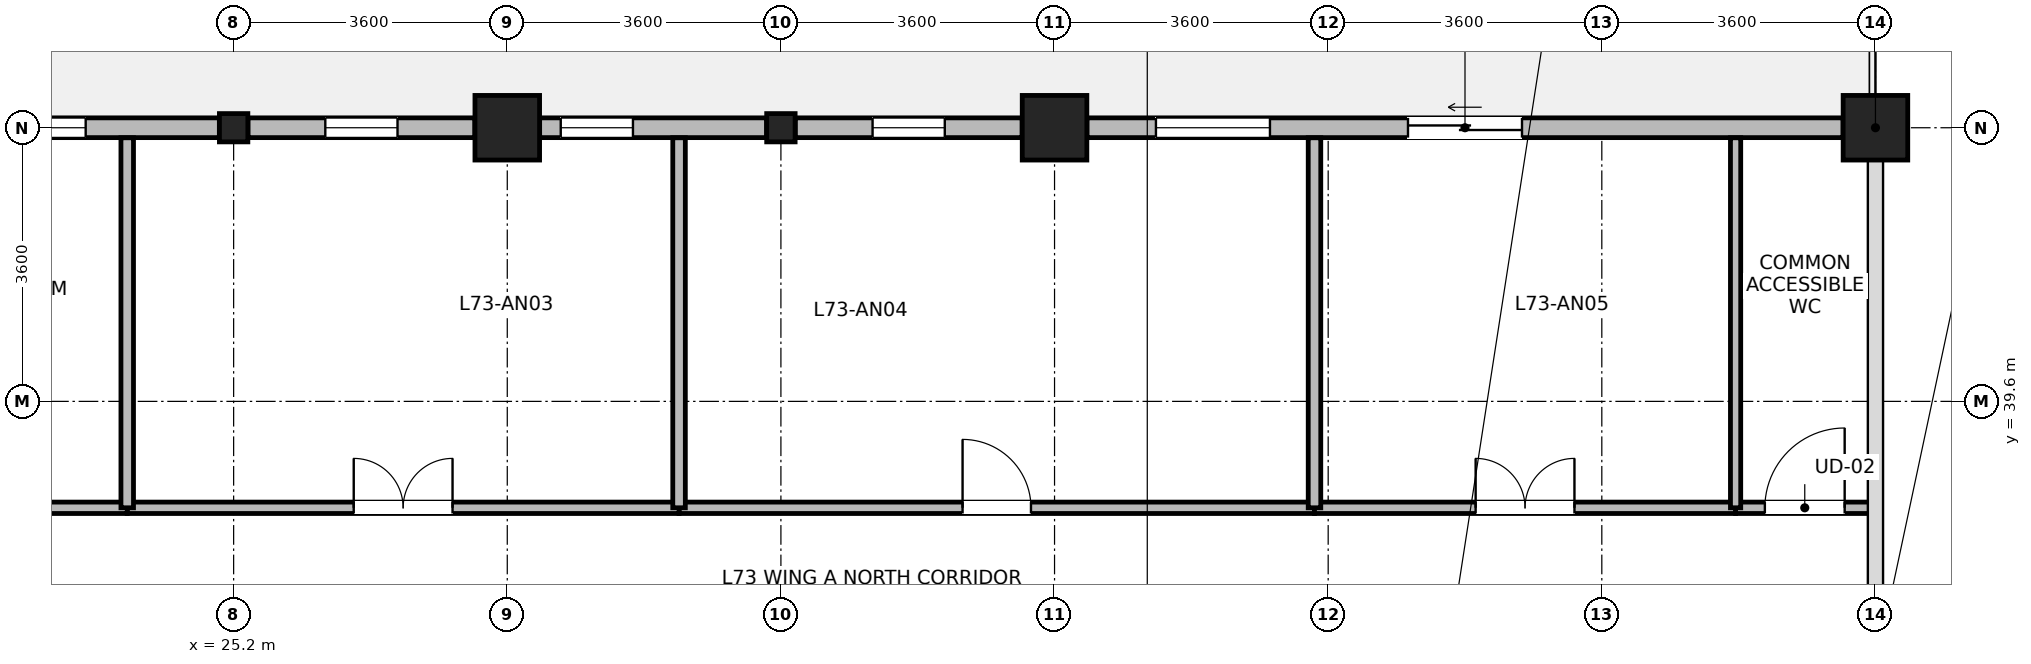
"""IFC4 building model, lengths in metres.
Left out: names, types, materials, properties, quantities, classifications, styles, units other than length and angle.
Written with IfcOpenShell. Run it as: python <this file> out.ifc"""

import sys

from ifc_helpers import new_model, si_unit, direction, frame, frame_2d, origin, origin_2d, place, context, subcontext, project, spatial, rectangle, i_section, extrude, source, transform, mapped, element, fill, save


model = new_model("IFC4")
c1 = context("Model", 3, precision=1e-05, world=origin(), true_north=direction((0.0, 1.0)))
c2 = subcontext(c1, "Body", "Model", "MODEL_VIEW")
j1 = project(units=[si_unit("LENGTHUNIT", "METRE"), si_unit("PLANEANGLEUNIT", "RADIAN")], contexts=[c1])
p1 = place(None, origin())
s1 = spatial("IfcSite", under=j1, at=p1, CompositionType="ELEMENT")
p2 = place(p1, origin())
s2 = spatial("IfcBuilding", under=s1, at=p2, CompositionType="ELEMENT")
p3 = place(p2, frame((0.0, 0.0, 283.2)))
s3 = spatial("IfcBuildingStorey", under=s2, at=p3, CompositionType="ELEMENT", Elevation=283.2)
m1 = source(origin(), c2, "Body", "SweptSolid", [
    extrude(rectangle(XDim=0.85, YDim=0.85, at=origin_2d()), origin(), (0.0, 0.0, 1.0), 3.7),
])
for number, where, z_axis, x_axis in (
    (1, (28.8, 43.2, 0.0), (0.0, 0.0, 1.0), (1.0, 0.0, 0.0)),
    (2, (36.0, 43.2, 0.0), (0.0, 0.0, 1.0), (1.0, 0.0, 0.0)),
    (3, (46.8, 43.2, 0.0), (0.0, 0.0, 1.0), (1.0, 0.0, 0.0)),
):
    element("IfcColumn", number, at=place(p3, frame(where, z_axis=z_axis, x_axis=x_axis)), inside=s3, PredefinedType="COLUMN", context=c2, shape_type="MappedRepresentation", body=[
        mapped(m1, transform((0.0, 0.0, 0.0), x_axis=(1.0, 0.0, 0.0), y_axis=(0.0, 1.0, 0.0), z_axis=(0.0, 0.0, 1.0), scale=1.0)),
    ])
m2 = source(origin(), c2, "Body", "SweptSolid", [
    extrude(i_section(OverallWidth=0.374, OverallDepth=0.372, WebThickness=0.015, FlangeThickness=0.026, FilletRadius=0.015, at=origin_2d()), origin(), (0.0, 0.0, 1.0), 3.7),
])
for number, where, z_axis, x_axis in (
    (4, (25.2, 43.2, 0.0), (0.0, 0.0, 1.0), (1.0, 0.0, 0.0)),
    (5, (32.4, 43.2, 0.0), (0.0, 0.0, 1.0), (1.0, 0.0, 0.0)),
):
    element("IfcColumn", number, at=place(p3, frame(where, z_axis=z_axis, x_axis=x_axis)), inside=s3, PredefinedType="COLUMN", context=c2, shape_type="MappedRepresentation", body=[
        mapped(m2, transform((0.0, 0.0, 0.0), x_axis=(1.0, 0.0, 0.0), y_axis=(0.0, 1.0, 0.0), z_axis=(0.0, 0.0, 1.0), scale=1.0)),
    ])
p4 = place(p3, frame((36.426, 43.2, 0.0), z_axis=(0.0, 0.0, 1.0), x_axis=(1.0, 0.0, 0.0)))
e6 = element("IfcWall", 6, at=p4, inside=s3, PredefinedType="STANDARD", context=c2, shape_type="SweptSolid", body=[
    extrude(rectangle(XDim=9.948, YDim=0.26, at=frame_2d((4.974, 0.0))), origin(), (0.0, 0.0, 1.0), 3.055),
])
p5 = place(p4, frame((4.224, 0.0, 0.0)))
e7 = element("IfcOpeningElement", 7, at=p5, cuts=e6, PredefinedType="OPENING", context=c2, shape_type="SweptSolid", body=[
    extrude(rectangle(XDim=1.5, YDim=2.15, at=frame_2d((0.75, 1.075))), frame((0.0, 0.14, 0.0), z_axis=(0.0, -1.0, 0.0), x_axis=(1.0, 0.0, 0.0)), (0.0, 0.0, 1.0), 0.28),
])
p6 = place(p4, frame((0.908, 0.0, 0.85)))
e8 = element("IfcOpeningElement", 8, at=p6, cuts=e6, PredefinedType="OPENING", context=c2, shape_type="SweptSolid", body=[
    extrude(rectangle(XDim=1.5, YDim=1.85, at=frame_2d((0.75, 0.925))), frame((0.0, 0.14, 0.0), z_axis=(0.0, -1.0, 0.0), x_axis=(1.0, 0.0, 0.0)), (0.0, 0.0, 1.0), 0.28),
])
p7 = place(p3, frame((32.588, 43.2, 0.0), z_axis=(0.0, 0.0, 1.0), x_axis=(1.0, 0.0, 0.0)))
e9 = element("IfcWall", 9, at=p7, inside=s3, PredefinedType="STANDARD", context=c2, shape_type="SweptSolid", body=[
    extrude(rectangle(XDim=2.986, YDim=0.26, at=frame_2d((1.493, 0.0))), origin(), (0.0, 0.0, 1.0), 3.055),
])
p8 = place(p7, frame((1.018, 0.0, 0.85)))
e10 = element("IfcOpeningElement", 10, at=p8, cuts=e9, PredefinedType="OPENING", context=c2, shape_type="SweptSolid", body=[
    extrude(rectangle(XDim=0.95, YDim=1.75, at=frame_2d((0.475, 0.875))), frame((0.0, 0.14, 0.0), z_axis=(0.0, -1.0, 0.0), x_axis=(1.0, 0.0, 0.0)), (0.0, 0.0, 1.0), 0.28),
])
p9 = place(p3, frame((29.226, 43.2, 0.0), z_axis=(0.0, 0.0, 1.0), x_axis=(1.0, 0.0, 0.0)))
e11 = element("IfcWall", 11, at=p9, inside=s3, PredefinedType="STANDARD", context=c2, shape_type="SweptSolid", body=[
    extrude(rectangle(XDim=2.986, YDim=0.26, at=frame_2d((1.493, 0.0))), origin(), (0.0, 0.0, 1.0), 3.055),
])
p10 = place(p9, frame((0.278, 0.0, 0.85)))
e12 = element("IfcOpeningElement", 12, at=p10, cuts=e11, PredefinedType="OPENING", context=c2, shape_type="SweptSolid", body=[
    extrude(rectangle(XDim=0.95, YDim=1.75, at=frame_2d((0.475, 0.875))), frame((0.0, 0.14, 0.0), z_axis=(0.0, -1.0, 0.0), x_axis=(1.0, 0.0, 0.0)), (0.0, 0.0, 1.0), 0.28),
])
p11 = place(p3, frame((25.388, 43.2, 0.0), z_axis=(0.0, 0.0, 1.0), x_axis=(1.0, 0.0, 0.0)))
e13 = element("IfcWall", 13, at=p11, inside=s3, PredefinedType="STANDARD", context=c2, shape_type="SweptSolid", body=[
    extrude(rectangle(XDim=2.986, YDim=0.26, at=frame_2d((1.493, 0.0))), origin(), (0.0, 0.0, 1.0), 3.055),
])
p12 = place(p11, frame((1.018, 0.0, 0.85)))
e14 = element("IfcOpeningElement", 14, at=p12, cuts=e13, PredefinedType="OPENING", context=c2, shape_type="SweptSolid", body=[
    extrude(rectangle(XDim=0.95, YDim=1.75, at=frame_2d((0.475, 0.875))), frame((0.0, 0.14, 0.0), z_axis=(0.0, -1.0, 0.0), x_axis=(1.0, 0.0, 0.0)), (0.0, 0.0, 1.0), 0.28),
])
p13 = place(p3, frame((22.026, 43.2, 0.0), z_axis=(0.0, 0.0, 1.0), x_axis=(1.0, 0.0, 0.0)))
e15 = element("IfcWall", 15, at=p13, inside=s3, PredefinedType="STANDARD", context=c2, shape_type="SweptSolid", body=[
    extrude(rectangle(XDim=2.986, YDim=0.26, at=frame_2d((1.493, 0.0))), origin(), (0.0, 0.0, 1.0), 3.055),
])
p14 = place(p13, frame((0.278, 0.0, 0.85)))
e16 = element("IfcOpeningElement", 16, at=p14, cuts=e15, PredefinedType="OPENING", context=c2, shape_type="SweptSolid", body=[
    extrude(rectangle(XDim=0.95, YDim=1.75, at=frame_2d((0.475, 0.875))), frame((0.0, 0.14, 0.0), z_axis=(0.0, -1.0, 0.0), x_axis=(1.0, 0.0, 0.0)), (0.0, 0.0, 1.0), 0.28),
])
p15 = place(p3, frame((31.06, 38.2, 0.0), z_axis=(0.0, 0.0, 1.0), x_axis=(1.0, 0.0, 0.0)))
e17 = element("IfcWall", 17, at=p15, inside=s3, PredefinedType="PARTITIONING", context=c2, shape_type="SweptSolid", body=[
    extrude(rectangle(XDim=8.36, YDim=0.15, at=frame_2d((4.18, 0.0))), origin(), (0.0, 0.0, 1.0), 3.455),
])
p16 = place(p15, frame((3.73, 0.0, 0.0)))
e18 = element("IfcOpeningElement", 18, at=p16, cuts=e17, PredefinedType="OPENING", context=c2, shape_type="SweptSolid", body=[
    extrude(rectangle(XDim=0.9, YDim=2.08, at=frame_2d((0.45, 1.04))), frame((0.0, 0.085, 0.0), z_axis=(0.0, -1.0, 0.0), x_axis=(1.0, 0.0, 0.0)), (0.0, 0.0, 1.0), 0.17),
])
p17 = place(p3, frame((23.8, 38.2, 0.0), z_axis=(0.0, 0.0, 1.0), x_axis=(1.0, 0.0, 0.0)))
e19 = element("IfcWall", 19, at=p17, inside=s3, PredefinedType="PARTITIONING", context=c2, shape_type="SweptSolid", body=[
    extrude(rectangle(XDim=7.26, YDim=0.15, at=frame_2d((3.63, 0.0))), origin(), (0.0, 0.0, 1.0), 3.455),
])
p18 = place(p17, frame((2.98, 0.0, 0.0)))
e20 = element("IfcOpeningElement", 20, at=p18, cuts=e19, PredefinedType="OPENING", context=c2, shape_type="SweptSolid", body=[
    extrude(rectangle(XDim=1.3, YDim=2.12, at=frame_2d((0.65, 1.06))), frame((0.0, 0.085, 0.0), z_axis=(0.0, -1.0, 0.0), x_axis=(1.0, 0.0, 0.0)), (0.0, 0.0, 1.0), 0.17),
])
p19 = place(p3, frame((39.42, 38.2, 0.0), z_axis=(0.0, 0.0, 1.0), x_axis=(1.0, 0.0, 0.0)))
e21 = element("IfcWall", 21, at=p19, inside=s3, PredefinedType="PARTITIONING", context=c2, shape_type="SweptSolid", body=[
    extrude(rectangle(XDim=5.54, YDim=0.15, at=frame_2d((2.77, 0.0))), origin(), (0.0, 0.0, 1.0), 3.455),
])
p20 = place(p19, frame((2.12, 0.0, 0.0)))
e22 = element("IfcOpeningElement", 22, at=p20, cuts=e21, PredefinedType="OPENING", context=c2, shape_type="SweptSolid", body=[
    extrude(rectangle(XDim=1.3, YDim=2.12, at=frame_2d((0.65, 1.06))), frame((0.0, 0.085, 0.0), z_axis=(0.0, -1.0, 0.0), x_axis=(1.0, 0.0, 0.0)), (0.0, 0.0, 1.0), 0.17),
])
p21 = place(p3, frame((18.36, 38.2, 0.0), z_axis=(0.0, 0.0, 1.0), x_axis=(1.0, 0.0, 0.0)))
e23 = element("IfcWall", 23, at=p21, inside=s3, PredefinedType="PARTITIONING", context=c2, shape_type="SweptSolid", body=[
    extrude(rectangle(XDim=5.44, YDim=0.15, at=frame_2d((2.72, 0.0))), origin(), (0.0, 0.0, 1.0), 3.455),
])
p22 = place(p21, frame((2.245, 0.0, 0.0)))
e24 = element("IfcOpeningElement", 24, at=p22, cuts=e23, PredefinedType="OPENING", context=c2, shape_type="SweptSolid", body=[
    extrude(rectangle(XDim=0.95, YDim=2.1, at=frame_2d((0.475, 1.05))), frame((0.0, 0.085, 0.0), z_axis=(0.0, -1.0, 0.0), x_axis=(1.0, 0.0, 0.0)), (0.0, 0.0, 1.0), 0.17),
])
p23 = place(p3, frame((44.96, 38.2, 0.0), z_axis=(0.0, 0.0, 1.0), x_axis=(1.0, 0.0, 0.0)))
e25 = element("IfcWall", 25, at=p23, inside=s3, PredefinedType="PARTITIONING", context=c2, shape_type="SweptSolid", body=[
    extrude(rectangle(XDim=1.82, YDim=0.15, at=frame_2d((0.91, 0.0))), origin(), (0.0, 0.0, 1.0), 3.455),
])
p24 = place(p23, frame((0.385, 0.0, 0.0)))
e26 = element("IfcOpeningElement", 26, at=p24, cuts=e25, PredefinedType="OPENING", context=c2, shape_type="SweptSolid", body=[
    extrude(rectangle(XDim=1.05, YDim=2.12, at=frame_2d((0.525, 1.06))), frame((0.0, 0.085, 0.0), z_axis=(0.0, -1.0, 0.0), x_axis=(1.0, 0.0, 0.0)), (0.0, 0.0, 1.0), 0.17),
])
for number, where, z_axis, x_axis in (
    (27, (23.8, 38.2, 0.0), (0.0, 0.0, 1.0), (0.0, 1.0, 0.0)),
    (28, (31.06, 38.2, 0.0), (0.0, 0.0, 1.0), (0.0, 1.0, 0.0)),
    (29, (39.42, 38.2, 0.0), (0.0, 0.0, 1.0), (0.0, 1.0, 0.0)),
):
    element("IfcWall", number, at=place(p3, frame(where, z_axis=z_axis, x_axis=x_axis)), inside=s3, PredefinedType="PARTITIONING", context=c2, shape_type="SweptSolid", body=[
        extrude(rectangle(XDim=4.868, YDim=0.165, at=frame_2d((2.434, 0.0))), origin(), (0.0, 0.0, 1.0), 3.455),
    ])
p25 = place(p3, frame((44.96, 38.2, 0.0), z_axis=(0.0, 0.0, 1.0), x_axis=(0.0, 1.0, 0.0)))
e30 = element("IfcWall", 30, at=p25, inside=s3, PredefinedType="PARTITIONING", context=c2, shape_type="SweptSolid", body=[
    extrude(rectangle(XDim=4.868, YDim=0.135, at=frame_2d((2.434, 0.0))), origin(), (0.0, 0.0, 1.0), 3.455),
])
p26 = place(p5, origin())
e31 = element("IfcDoor", 31, at=p26, inside=s3, OperationType="SLIDING_TO_LEFT", PredefinedType="DOOR", context=c2, shape_type="SweptSolid", body=[
    extrude(rectangle(XDim=1.5, YDim=2.15, at=frame_2d((0.75, 1.075))), frame((0.0, 0.025, 0.0), z_axis=(0.0, -1.0, 0.0), x_axis=(1.0, 0.0, 0.0)), (0.0, 0.0, 1.0), 0.05),
])
fill(e7, e31)
p27 = place(p6, origin())
e32 = element("IfcWindow", 32, at=p27, inside=s3, PartitioningType="SINGLE_PANEL", PredefinedType="WINDOW", context=c2, shape_type="SweptSolid", body=[
    extrude(rectangle(XDim=1.5, YDim=1.85, at=frame_2d((0.75, 0.925))), frame((0.0, 0.03, 0.0), z_axis=(0.0, -1.0, 0.0), x_axis=(1.0, 0.0, 0.0)), (0.0, 0.0, 1.0), 0.06),
])
fill(e8, e32)
p28 = place(p8, origin())
e33 = element("IfcWindow", 33, at=p28, inside=s3, PartitioningType="SINGLE_PANEL", PredefinedType="WINDOW", context=c2, shape_type="SweptSolid", body=[
    extrude(rectangle(XDim=0.95, YDim=1.75, at=frame_2d((0.475, 0.875))), frame((0.0, 0.03, 0.0), z_axis=(0.0, -1.0, 0.0), x_axis=(1.0, 0.0, 0.0)), (0.0, 0.0, 1.0), 0.06),
])
fill(e10, e33)
p29 = place(p10, origin())
e34 = element("IfcWindow", 34, at=p29, inside=s3, PartitioningType="SINGLE_PANEL", PredefinedType="WINDOW", context=c2, shape_type="SweptSolid", body=[
    extrude(rectangle(XDim=0.95, YDim=1.75, at=frame_2d((0.475, 0.875))), frame((0.0, 0.03, 0.0), z_axis=(0.0, -1.0, 0.0), x_axis=(1.0, 0.0, 0.0)), (0.0, 0.0, 1.0), 0.06),
])
fill(e12, e34)
p30 = place(p12, origin())
e35 = element("IfcWindow", 35, at=p30, inside=s3, PartitioningType="SINGLE_PANEL", PredefinedType="WINDOW", context=c2, shape_type="SweptSolid", body=[
    extrude(rectangle(XDim=0.95, YDim=1.75, at=frame_2d((0.475, 0.875))), frame((0.0, 0.03, 0.0), z_axis=(0.0, -1.0, 0.0), x_axis=(1.0, 0.0, 0.0)), (0.0, 0.0, 1.0), 0.06),
])
fill(e14, e35)
p31 = place(p14, origin())
e36 = element("IfcWindow", 36, at=p31, inside=s3, PartitioningType="SINGLE_PANEL", PredefinedType="WINDOW", context=c2, shape_type="SweptSolid", body=[
    extrude(rectangle(XDim=0.95, YDim=1.75, at=frame_2d((0.475, 0.875))), frame((0.0, 0.03, 0.0), z_axis=(0.0, -1.0, 0.0), x_axis=(1.0, 0.0, 0.0)), (0.0, 0.0, 1.0), 0.06),
])
fill(e16, e36)
p32 = place(p16, origin())
e37 = element("IfcDoor", 37, at=p32, inside=s3, OperationType="SINGLE_SWING_LEFT", PredefinedType="DOOR", context=c2, shape_type="SweptSolid", body=[
    extrude(rectangle(XDim=0.9, YDim=2.08, at=frame_2d((0.45, 1.04))), frame((0.0, 0.025, 0.0), z_axis=(0.0, -1.0, 0.0), x_axis=(1.0, 0.0, 0.0)), (0.0, 0.0, 1.0), 0.05),
])
fill(e18, e37)
p33 = place(p18, origin())
e38 = element("IfcDoor", 38, at=p33, inside=s3, OperationType="DOUBLE_DOOR_SINGLE_SWING", PredefinedType="DOOR", context=c2, shape_type="SweptSolid", body=[
    extrude(rectangle(XDim=1.3, YDim=2.12, at=frame_2d((0.65, 1.06))), frame((0.0, 0.025, 0.0), z_axis=(0.0, -1.0, 0.0), x_axis=(1.0, 0.0, 0.0)), (0.0, 0.0, 1.0), 0.05),
])
fill(e20, e38)
p34 = place(p20, origin())
e39 = element("IfcDoor", 39, at=p34, inside=s3, OperationType="DOUBLE_DOOR_SINGLE_SWING", PredefinedType="DOOR", context=c2, shape_type="SweptSolid", body=[
    extrude(rectangle(XDim=1.3, YDim=2.12, at=frame_2d((0.65, 1.06))), frame((0.0, 0.025, 0.0), z_axis=(0.0, -1.0, 0.0), x_axis=(1.0, 0.0, 0.0)), (0.0, 0.0, 1.0), 0.05),
])
fill(e22, e39)
p35 = place(p24, origin())
e40 = element("IfcDoor", 40, at=p35, inside=s3, OperationType="SINGLE_SWING_RIGHT", PredefinedType="DOOR", context=c2, shape_type="SweptSolid", body=[
    extrude(rectangle(XDim=1.05, YDim=2.12, at=frame_2d((0.525, 1.06))), frame((0.0, 0.025, 0.0), z_axis=(0.0, -1.0, 0.0), x_axis=(1.0, 0.0, 0.0)), (0.0, 0.0, 1.0), 0.05),
])
fill(e26, e40)
save(model, sys.argv[1])
